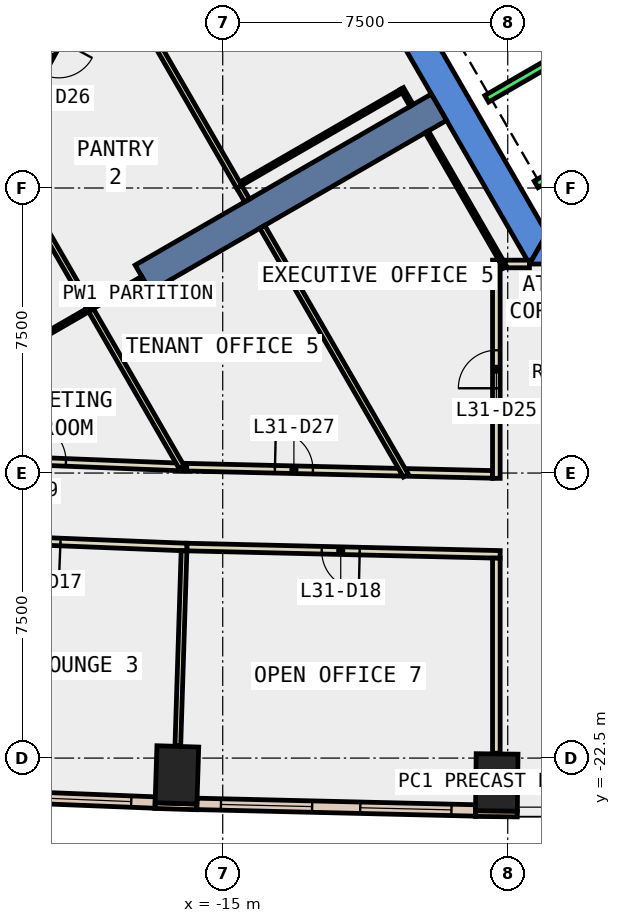
"""IFC4 building model, lengths in metres.
Left out: names, types, materials, properties, quantities, classifications, styles, units other than length and angle.
Written with IfcOpenShell. Run it as: python <this file> out.ifc"""

import sys

from ifc_helpers import new_model, si_unit, direction, frame, frame_2d, origin, origin_2d, place, context, subcontext, project, spatial, polyline, rectangle, outline, extrude, element, fill, save


model = new_model("IFC4")
c1 = context("Model", 3, precision=1e-05, world=origin(), true_north=direction((0.0, 1.0)))
c2 = subcontext(c1, "Body", "Model", "MODEL_VIEW")
j1 = project(units=[si_unit("LENGTHUNIT", "METRE"), si_unit("PLANEANGLEUNIT", "RADIAN")], contexts=[c1])
p1 = place(None, origin())
s1 = spatial("IfcSite", under=j1, at=p1, CompositionType="ELEMENT")
p2 = place(p1, origin())
s2 = spatial("IfcBuilding", under=s1, at=p2, CompositionType="ELEMENT")
p3 = place(p2, frame((0.0, 0.0, 142.4)))
s3 = spatial("IfcBuildingStorey", under=s2, at=p3, CompositionType="ELEMENT", Elevation=142.4)
for number, where, z_axis, x_axis in (
    (1, (-16.205, -22.942, -0.4), (0.0, 0.0, 1.0), (-0.999, 0.032, 0.0)),
    (2, (-7.789, -23.141, -0.4), (0.0, 0.0, 1.0), (-1.0, 0.012, 0.0)),
):
    element("IfcColumn", number, at=place(p3, frame(where, z_axis=z_axis, x_axis=x_axis)), inside=s3, PredefinedType="COLUMN", context=c2, shape_type="SweptSolid", body=[
        extrude(rectangle(XDim=1.1, YDim=1.5, at=origin_2d()), origin(), (0.0, 0.0, 1.0), 4.2),
    ])
p4 = place(p3, frame((0.0, 0.0, -0.4)))
e3 = element("IfcWall", 3, at=p4, inside=s3, PredefinedType="SHEAR", context=c2, shape_type="SweptSolid", body=[
    extrude(outline(polyline([(-13.856, 2.5), (-6.928, -9.5), (-6.466, -8.7), (-12.933, 2.5), (-13.856, 2.5)])), origin(), (0.0, 0.0, 1.0), 4.2),
])
p5 = place(p3, frame((0.0, 0.0, -0.4)))
e4 = element("IfcWall", 4, at=p5, inside=s3, PredefinedType="SHEAR", context=c2, shape_type="SweptSolid", body=[
    extrude(outline(polyline([(3.75, -9.5), (3.75, -8.7), (-6.466, -8.7), (-6.928, -9.5), (3.75, -9.5)])), origin(), (0.0, 0.0, 1.0), 4.2),
])
p6 = place(p3, frame((-9.31, -5.375, -0.4), z_axis=(0.0, 0.0, 1.0), x_axis=(-0.866017533419, -0.500013631625, 0.0)))
e5 = element("IfcWall", 5, at=p6, inside=s3, PredefinedType="SHEAR", context=c2, shape_type="SweptSolid", body=[
    extrude(rectangle(XDim=9.0, YDim=0.8, at=frame_2d((4.5, 0.0))), origin(), (0.0, 0.0, 1.0), 4.2),
])
p7 = place(p3, frame((-16.781, -23.75, 0.0), z_axis=(0.0, 0.0, 1.0), x_axis=(0.999523702549, -0.030860460829, 0.0)))
e6 = element("IfcWall", 6, at=p7, inside=s3, PredefinedType="STANDARD", context=c2, shape_type="SweptSolid", body=[
    extrude(rectangle(XDim=1.1, YDim=0.15, at=frame_2d((0.55, 0.0))), origin(), (0.0, 0.0, 1.0), 3.8),
])
p8 = place(p3, frame((-8.349, -23.96, 0.0), z_axis=(0.0, 0.0, 1.0), x_axis=(0.999940879068, -0.010873746799, 0.0)))
e7 = element("IfcWall", 7, at=p8, inside=s3, PredefinedType="STANDARD", context=c2, shape_type="SweptSolid", body=[
    extrude(rectangle(XDim=1.1, YDim=0.15, at=frame_2d((0.55, 0.0))), origin(), (0.0, 0.0, 1.0), 3.8),
])
p9 = place(p3, frame((-24.09, -23.378, 0.0), z_axis=(0.0, 0.0, 1.0), x_axis=(0.999203621229, -0.039901420066, 0.0)))
e8 = element("IfcWall", 8, at=p9, inside=s3, PredefinedType="STANDARD", context=c2, shape_type="SweptSolid", body=[
    extrude(rectangle(XDim=7.318, YDim=0.3, at=frame_2d((3.659, 0.0))), origin(), (0.0, 0.0, 1.0), 3.8),
])
p10 = place(p9, frame((0.629, 0.0, 0.9)))
e9 = element("IfcOpeningElement", 9, at=p10, cuts=e8, PredefinedType="OPENING", context=c2, shape_type="SweptSolid", body=[
    extrude(rectangle(XDim=2.4, YDim=2.6, at=frame_2d((1.2, 1.3))), frame((0.0, 0.16, 0.0), z_axis=(0.0, -1.0, 0.0), x_axis=(1.0, 0.0, 0.0)), (0.0, 0.0, 1.0), 0.32),
])
p11 = place(p9, frame((4.288, 0.0, 0.9)))
e10 = element("IfcOpeningElement", 10, at=p11, cuts=e8, PredefinedType="OPENING", context=c2, shape_type="SweptSolid", body=[
    extrude(rectangle(XDim=2.4, YDim=2.6, at=frame_2d((1.2, 1.3))), frame((0.0, 0.16, 0.0), z_axis=(0.0, -1.0, 0.0), x_axis=(1.0, 0.0, 0.0)), (0.0, 0.0, 1.0), 0.32),
])
p12 = place(p3, frame((-15.68, -23.705, 0.0), z_axis=(0.0, 0.0, 1.0), x_axis=(0.999722302867, -0.023565168146, 0.0)))
e11 = element("IfcWall", 11, at=p12, inside=s3, PredefinedType="STANDARD", context=c2, shape_type="SweptSolid", body=[
    extrude(rectangle(XDim=7.335, YDim=0.3, at=frame_2d((3.667, 0.0))), origin(), (0.0, 0.0, 1.0), 3.8),
])
p13 = place(p12, frame((0.634, 0.0, 0.9)))
e12 = element("IfcOpeningElement", 12, at=p13, cuts=e11, PredefinedType="OPENING", context=c2, shape_type="SweptSolid", body=[
    extrude(rectangle(XDim=2.4, YDim=2.6, at=frame_2d((1.2, 1.3))), frame((0.0, 0.16, 0.0), z_axis=(0.0, -1.0, 0.0), x_axis=(1.0, 0.0, 0.0)), (0.0, 0.0, 1.0), 0.32),
])
p14 = place(p12, frame((4.301, 0.0, 0.9)))
e13 = element("IfcOpeningElement", 13, at=p14, cuts=e11, PredefinedType="OPENING", context=c2, shape_type="SweptSolid", body=[
    extrude(rectangle(XDim=2.4, YDim=2.6, at=frame_2d((1.2, 1.3))), frame((0.0, 0.16, 0.0), z_axis=(0.0, -1.0, 0.0), x_axis=(1.0, 0.0, 0.0)), (0.0, 0.0, 1.0), 0.32),
])
p15 = place(p3, frame((-10.155, -14.983, 0.0), z_axis=(0.0, 0.0, 1.0), x_axis=(0.999724165956, -0.023485995887, 0.0)))
e14 = element("IfcWall", 14, at=p15, inside=s3, PredefinedType="PARTITIONING", context=c2, shape_type="SweptSolid", body=[
    extrude(rectangle(XDim=2.256, YDim=0.2, at=frame_2d((1.128, 0.0))), origin(), (0.0, 0.0, 1.0), 3.8),
])
p16 = place(p3, frame((-18.178, -1.501, 0.0), z_axis=(0.0, 0.0, 1.0), x_axis=(-0.475923642768, -0.879486603795, 0.0)))
e15 = element("IfcWall", 15, at=p16, inside=s3, PredefinedType="PARTITIONING", context=c2, shape_type="SweptSolid", body=[
    extrude(rectangle(XDim=5.776, YDim=0.2, at=frame_2d((2.888, 0.0))), origin(), (0.0, 0.0, 1.0), 3.8),
])
p17 = place(p16, frame((2.388, 0.0, 0.0)))
e16 = element("IfcOpeningElement", 16, at=p17, cuts=e15, PredefinedType="OPENING", context=c2, shape_type="SweptSolid", body=[
    extrude(rectangle(XDim=1.0, YDim=2.1, at=frame_2d((0.5, 1.05))), frame((0.0, 0.11, 0.0), z_axis=(0.0, -1.0, 0.0), x_axis=(1.0, 0.0, 0.0)), (0.0, 0.0, 1.0), 0.22),
])
p18 = place(p3, frame((-15.948, -14.846, 0.0), z_axis=(0.0, 0.0, 1.0), x_axis=(0.999722136341, -0.023572231734, 0.0)))
e17 = element("IfcWall", 17, at=p18, inside=s3, PredefinedType="PARTITIONING", context=c2, shape_type="SweptSolid", body=[
    extrude(rectangle(XDim=5.645, YDim=0.2, at=frame_2d((2.822, 0.0))), origin(), (0.0, 0.0, 1.0), 3.8),
])
p19 = place(p18, frame((2.322, 0.0, 0.0)))
e18 = element("IfcOpeningElement", 18, at=p19, cuts=e17, PredefinedType="OPENING", context=c2, shape_type="SweptSolid", body=[
    extrude(rectangle(XDim=1.0, YDim=2.1, at=frame_2d((0.5, 1.05))), frame((0.0, 0.11, 0.0), z_axis=(0.0, -1.0, 0.0), x_axis=(1.0, 0.0, 0.0)), (0.0, 0.0, 1.0), 0.22),
])
p20 = place(p3, frame((-23.242, -14.555, 0.0), z_axis=(0.0, 0.0, 1.0), x_axis=(0.999202143743, -0.039938401802, 0.0)))
e19 = element("IfcWall", 19, at=p20, inside=s3, PredefinedType="PARTITIONING", context=c2, shape_type="SweptSolid", body=[
    extrude(rectangle(XDim=7.238, YDim=0.2, at=frame_2d((3.619, 0.0))), origin(), (0.0, 0.0, 1.0), 3.8),
])
p21 = place(p20, frame((3.119, 0.0, 0.0)))
e20 = element("IfcOpeningElement", 20, at=p21, cuts=e19, PredefinedType="OPENING", context=c2, shape_type="SweptSolid", body=[
    extrude(rectangle(XDim=1.0, YDim=2.1, at=frame_2d((0.5, 1.05))), frame((0.0, 0.11, 0.0), z_axis=(0.0, -1.0, 0.0), x_axis=(1.0, 0.0, 0.0)), (0.0, 0.0, 1.0), 0.22),
])
p22 = place(p3, frame((-15.94, -16.948, 0.0), z_axis=(0.0, 0.0, 1.0), x_axis=(-0.999203094545, 0.03991460699, 0.0)))
e21 = element("IfcWall", 21, at=p22, inside=s3, PredefinedType="PARTITIONING", context=c2, shape_type="SweptSolid", body=[
    extrude(rectangle(XDim=7.664, YDim=0.2, at=frame_2d((3.832, 0.0))), origin(), (0.0, 0.0, 1.0), 3.8),
])
p23 = place(p22, frame((3.332, 0.0, 0.0)))
e22 = element("IfcOpeningElement", 22, at=p23, cuts=e21, PredefinedType="OPENING", context=c2, shape_type="SweptSolid", body=[
    extrude(rectangle(XDim=1.0, YDim=2.1, at=frame_2d((0.5, 1.05))), frame((0.0, 0.11, 0.0), z_axis=(0.0, -1.0, 0.0), x_axis=(1.0, 0.0, 0.0)), (0.0, 0.0, 1.0), 0.22),
])
p24 = place(p3, frame((-7.7, -17.141, 0.0), z_axis=(0.0, 0.0, 1.0), x_axis=(-0.999722699727, 0.023548325865, 0.0)))
e23 = element("IfcWall", 23, at=p24, inside=s3, PredefinedType="PARTITIONING", context=c2, shape_type="SweptSolid", body=[
    extrude(rectangle(XDim=8.242, YDim=0.2, at=frame_2d((4.121, 0.0))), origin(), (0.0, 0.0, 1.0), 3.8),
])
p25 = place(p24, frame((3.696, 0.0, 0.0)))
e24 = element("IfcOpeningElement", 24, at=p25, cuts=e23, PredefinedType="OPENING", context=c2, shape_type="SweptSolid", body=[
    extrude(rectangle(XDim=1.0, YDim=2.1, at=frame_2d((0.5, 1.05))), frame((0.0, 0.11, 0.0), z_axis=(0.0, -1.0, 0.0), x_axis=(1.0, 0.0, 0.0)), (0.0, 0.0, 1.0), 0.22),
])
p26 = place(p3, frame((-7.572, -9.499, 0.0), z_axis=(0.0, 0.0, 1.0), x_axis=(1.0, 0.0, 0.0)))
e25 = element("IfcWall", 25, at=p26, inside=s3, PredefinedType="PARTITIONING", context=c2, shape_type="SweptSolid", body=[
    extrude(rectangle(XDim=0.643, YDim=0.2, at=frame_2d((0.322, 0.0))), origin(), (0.0, 0.0, 1.0), 3.8),
])
p27 = place(p3, frame((-7.8, -15.139, 0.0), z_axis=(0.0, 0.0, 1.0), x_axis=(0.0, 1.0, 0.0)))
e26 = element("IfcWall", 26, at=p27, inside=s3, PredefinedType="PARTITIONING", context=c2, shape_type="SweptSolid", body=[
    extrude(rectangle(XDim=5.74, YDim=0.2, at=frame_2d((2.87, 0.0))), origin(), (0.0, 0.0, 1.0), 3.8),
])
p28 = place(p27, frame((2.37, 0.0, 0.0)))
e27 = element("IfcOpeningElement", 27, at=p28, cuts=e26, PredefinedType="OPENING", context=c2, shape_type="SweptSolid", body=[
    extrude(rectangle(XDim=1.0, YDim=2.1, at=frame_2d((0.5, 1.05))), frame((0.0, 0.11, 0.0), z_axis=(0.0, -1.0, 0.0), x_axis=(1.0, 0.0, 0.0)), (0.0, 0.0, 1.0), 0.22),
])
p29 = place(p3, frame((-7.8, -22.371, 0.0), z_axis=(0.0, 0.0, 1.0), x_axis=(0.0, 1.0, 0.0)))
e28 = element("IfcWall", 28, at=p29, inside=s3, PredefinedType="PARTITIONING", context=c2, shape_type="SweptSolid", body=[
    extrude(rectangle(XDim=5.132, YDim=0.2, at=frame_2d((2.566, 0.0))), origin(), (0.0, 0.0, 1.0), 3.8),
])
p30 = place(p3, frame((-7.572, -9.586, 0.0), z_axis=(0.0, 0.0, 1.0), x_axis=(-0.500037407586, 0.866003805427, 0.0)))
e29 = element("IfcWall", 29, at=p30, inside=s3, PredefinedType="PARTITIONING", context=c2, shape_type="SweptSolid", body=[
    extrude(rectangle(XDim=4.115, YDim=0.1, at=frame_2d((2.058, 0.0))), origin(), (0.0, 0.0, 1.0), 3.8),
])
p31 = place(p3, frame((-10.305, -4.951, 0.0), z_axis=(0.0, 0.0, 1.0), x_axis=(-0.866031185235, -0.4999899861, 0.0)))
e30 = element("IfcWall", 30, at=p31, inside=s3, PredefinedType="PARTITIONING", context=c2, shape_type="SweptSolid", body=[
    extrude(rectangle(XDim=4.95, YDim=0.1, at=frame_2d((2.475, 0.0))), origin(), (0.0, 0.0, 1.0), 3.8),
])
p32 = place(p3, frame((-14.567, -7.469, 0.0), z_axis=(0.0, 0.0, 1.0), x_axis=(-0.500056007527, 0.865993065409, 0.0)))
e31 = element("IfcWall", 31, at=p32, inside=s3, PredefinedType="PARTITIONING", context=c2, shape_type="SweptSolid", body=[
    extrude(rectangle(XDim=7.159, YDim=0.15, at=frame_2d((3.58, 0.0))), origin(), (0.0, 0.0, 1.0), 3.8),
])
p33 = place(p3, frame((-14.359, -7.828, 0.0), z_axis=(0.0, 0.0, 1.0), x_axis=(-0.501453821755, 0.865184410775, 0.0)))
e32 = element("IfcWall", 32, at=p33, inside=s3, PredefinedType="PARTITIONING", context=c2, shape_type="SweptSolid", body=[
    extrude(rectangle(XDim=0.415, YDim=0.15, at=frame_2d((0.208, 0.0))), origin(), (0.0, 0.0, 1.0), 3.8),
])
p34 = place(p3, frame((-10.18, -15.068, 0.0), z_axis=(0.0, 0.0, 1.0), x_axis=(-0.499907901386, 0.866078570415, 0.0)))
e33 = element("IfcWall", 33, at=p34, inside=s3, PredefinedType="PARTITIONING", context=c2, shape_type="SweptSolid", body=[
    extrude(rectangle(XDim=7.56, YDim=0.15, at=frame_2d((3.78, 0.0))), origin(), (0.0, 0.0, 1.0), 3.8),
])
p35 = place(p3, frame((-17.108, -9.869, 0.0), z_axis=(0.0, 0.0, 1.0), x_axis=(-0.866054481515, -0.499949632511, 0.0)))
e34 = element("IfcWall", 34, at=p35, inside=s3, PredefinedType="PARTITIONING", context=c2, shape_type="SweptSolid", body=[
    extrude(rectangle(XDim=1.675, YDim=0.1, at=frame_2d((0.837, 0.0))), origin(), (0.0, 0.0, 1.0), 3.8),
])
p36 = place(p3, frame((-18.518, -10.625, 0.0), z_axis=(0.0, 0.0, 1.0), x_axis=(-0.50001189137, 0.86601853819, 0.0)))
e35 = element("IfcWall", 35, at=p36, inside=s3, PredefinedType="PARTITIONING", context=c2, shape_type="SweptSolid", body=[
    extrude(rectangle(XDim=4.746, YDim=0.15, at=frame_2d((2.373, 0.0))), origin(), (0.0, 0.0, 1.0), 3.8),
])
p37 = place(p3, frame((-16.084, -14.841, 0.0), z_axis=(0.0, 0.0, 1.0), x_axis=(-0.50002451059, 0.866011252126, 0.0)))
e36 = element("IfcWall", 36, at=p37, inside=s3, PredefinedType="PARTITIONING", context=c2, shape_type="SweptSolid", body=[
    extrude(rectangle(XDim=4.758, YDim=0.15, at=frame_2d((2.379, 0.0))), origin(), (0.0, 0.0, 1.0), 3.8),
])
p38 = place(p3, frame((-18.553, -10.715, 0.0), z_axis=(0.0, 0.0, 1.0), x_axis=(-0.865984622623, -0.500070628392, 0.0)))
e37 = element("IfcWall", 37, at=p38, inside=s3, PredefinedType="PARTITIONING", context=c2, shape_type="SweptSolid", body=[
    extrude(rectangle(XDim=6.879, YDim=0.1, at=frame_2d((3.439, 0.0))), origin(), (0.0, 0.0, 1.0), 3.8),
])
p39 = place(p3, frame((-16.018, -17.045, 0.0), z_axis=(0.0, 0.0, 1.0), x_axis=(-0.031744385759, -0.999496019988, 0.0)))
e38 = element("IfcWall", 38, at=p39, inside=s3, PredefinedType="PARTITIONING", context=c2, shape_type="SweptSolid", body=[
    extrude(rectangle(XDim=5.13, YDim=0.15, at=frame_2d((2.565, 0.0))), origin(), (0.0, 0.0, 1.0), 3.8),
])
p40 = place(p3, frame((-10.03, -5.329, 0.0), z_axis=(0.0, 0.0, 1.0), x_axis=(-0.499352927503, 0.866398669086, 0.0)))
e39 = element("IfcWall", 39, at=p40, inside=s3, PredefinedType="PARTITIONING", context=c2, shape_type="SweptSolid", body=[
    extrude(rectangle(XDim=0.515, YDim=0.1, at=frame_2d((0.257, 0.0))), origin(), (0.0, 0.0, 1.0), 3.8),
])
p41 = place(p3, frame((-9.751, 2.99, 0.0), z_axis=(0.0, 0.0, 1.0), x_axis=(0.50000090737, -0.866024879913, 0.0)))
e40 = element("IfcWall", 40, at=p41, inside=s3, PredefinedType="STANDARD", context=c2, shape_type="SweptSolid", body=[
    extrude(rectangle(XDim=10.6, YDim=0.2, at=frame_2d((5.3, 0.0))), origin(), (0.0, 0.0, 1.0), 3.8),
])
for number, where, z_axis, x_axis in (
    (41, (-5.888, -3.902, 0.0), (0.0, 0.0, 1.0), (-0.866, -0.5, 0.0)),
    (42, (-4.588, -6.153, 0.0), (0.0, 0.0, 1.0), (-0.866, -0.5, 0.0)),
):
    element("IfcWall", number, at=place(p3, frame(where, z_axis=z_axis, x_axis=x_axis)), inside=s3, PredefinedType="STANDARD", context=c2, shape_type="SweptSolid", body=[
        extrude(rectangle(XDim=2.5, YDim=0.2, at=frame_2d((1.25, 0.0))), origin(), (0.0, 0.0, 1.0), 3.8),
    ])
p42 = place(p11, origin())
e43 = element("IfcWindow", 43, at=p42, inside=s3, PartitioningType="SINGLE_PANEL", PredefinedType="WINDOW", context=c2, shape_type="SweptSolid", body=[
    extrude(rectangle(XDim=2.4, YDim=2.6, at=frame_2d((1.2, 1.3))), frame((0.0, 0.03, 0.0), z_axis=(0.0, -1.0, 0.0), x_axis=(1.0, 0.0, 0.0)), (0.0, 0.0, 1.0), 0.06),
])
fill(e10, e43)
p43 = place(p13, origin())
e44 = element("IfcWindow", 44, at=p43, inside=s3, PartitioningType="SINGLE_PANEL", PredefinedType="WINDOW", context=c2, shape_type="SweptSolid", body=[
    extrude(rectangle(XDim=2.4, YDim=2.6, at=frame_2d((1.2, 1.3))), frame((0.0, 0.03, 0.0), z_axis=(0.0, -1.0, 0.0), x_axis=(1.0, 0.0, 0.0)), (0.0, 0.0, 1.0), 0.06),
])
fill(e12, e44)
p44 = place(p14, origin())
e45 = element("IfcWindow", 45, at=p44, inside=s3, PartitioningType="SINGLE_PANEL", PredefinedType="WINDOW", context=c2, shape_type="SweptSolid", body=[
    extrude(rectangle(XDim=2.4, YDim=2.6, at=frame_2d((1.2, 1.3))), frame((0.0, 0.03, 0.0), z_axis=(0.0, -1.0, 0.0), x_axis=(1.0, 0.0, 0.0)), (0.0, 0.0, 1.0), 0.06),
])
fill(e13, e45)
p45 = place(p23, origin())
e46 = element("IfcDoor", 46, at=p45, inside=s3, OperationType="SINGLE_SWING_LEFT", PredefinedType="DOOR", context=c2, shape_type="SweptSolid", body=[
    extrude(rectangle(XDim=1.0, YDim=2.1, at=frame_2d((0.5, 1.05))), frame((0.0, 0.025, 0.0), z_axis=(0.0, -1.0, 0.0), x_axis=(1.0, 0.0, 0.0)), (0.0, 0.0, 1.0), 0.05),
])
fill(e22, e46)
p46 = place(p25, origin())
e47 = element("IfcDoor", 47, at=p46, inside=s3, OperationType="SINGLE_SWING_RIGHT", PredefinedType="DOOR", context=c2, shape_type="SweptSolid", body=[
    extrude(rectangle(XDim=1.0, YDim=2.1, at=frame_2d((0.5, 1.05))), frame((0.0, 0.025, 0.0), z_axis=(0.0, -1.0, 0.0), x_axis=(1.0, 0.0, 0.0)), (0.0, 0.0, 1.0), 0.05),
])
fill(e24, e47)
p47 = place(p28, origin())
e48 = element("IfcDoor", 48, at=p47, inside=s3, OperationType="SINGLE_SWING_LEFT", PredefinedType="DOOR", context=c2, shape_type="SweptSolid", body=[
    extrude(rectangle(XDim=1.0, YDim=2.1, at=frame_2d((0.5, 1.05))), frame((0.0, 0.025, 0.0), z_axis=(0.0, -1.0, 0.0), x_axis=(1.0, 0.0, 0.0)), (0.0, 0.0, 1.0), 0.05),
])
fill(e27, e48)
p48 = place(p17, origin())
e49 = element("IfcDoor", 49, at=p48, inside=s3, OperationType="SINGLE_SWING_LEFT", PredefinedType="DOOR", context=c2, shape_type="SweptSolid", body=[
    extrude(rectangle(XDim=1.0, YDim=2.1, at=frame_2d((0.5, 1.05))), frame((0.0, 0.025, 0.0), z_axis=(0.0, -1.0, 0.0), x_axis=(1.0, 0.0, 0.0)), (0.0, 0.0, 1.0), 0.05),
])
fill(e16, e49)
p49 = place(p19, origin())
e50 = element("IfcDoor", 50, at=p49, inside=s3, OperationType="SINGLE_SWING_LEFT", PredefinedType="DOOR", context=c2, shape_type="SweptSolid", body=[
    extrude(rectangle(XDim=1.0, YDim=2.1, at=frame_2d((0.5, 1.05))), frame((0.0, 0.025, 0.0), z_axis=(0.0, -1.0, 0.0), x_axis=(1.0, 0.0, 0.0)), (0.0, 0.0, 1.0), 0.05),
])
fill(e18, e50)
p50 = place(p21, origin())
e51 = element("IfcDoor", 51, at=p50, inside=s3, OperationType="SINGLE_SWING_LEFT", PredefinedType="DOOR", context=c2, shape_type="SweptSolid", body=[
    extrude(rectangle(XDim=1.0, YDim=2.1, at=frame_2d((0.5, 1.05))), frame((0.0, 0.025, 0.0), z_axis=(0.0, -1.0, 0.0), x_axis=(1.0, 0.0, 0.0)), (0.0, 0.0, 1.0), 0.05),
])
fill(e20, e51)
save(model, sys.argv[1])
